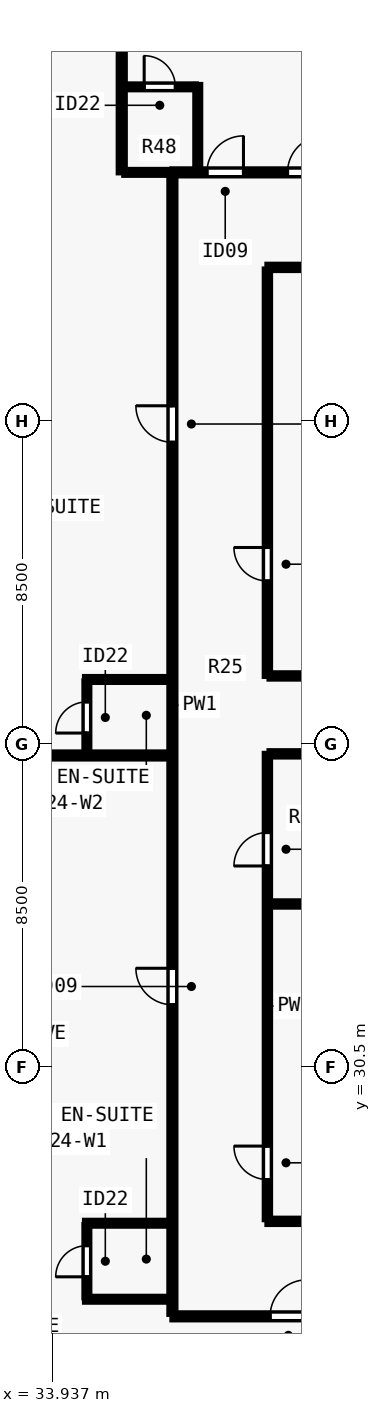
"""IFC4 building model, lengths in metres.
Left out: names, types, materials, properties, quantities, classifications, styles, units other than length and angle.
Written with IfcOpenShell. Run it as: python <this file> out.ifc"""

import sys

from ifc_helpers import new_model, si_unit, direction, frame, frame_2d, origin, place, context, subcontext, project, spatial, rectangle, extrude, element, fill, save


model = new_model("IFC4")
c1 = context("Model", 3, precision=1e-05, world=origin(), true_north=direction((0.0, 1.0)))
c2 = subcontext(c1, "Body", "Model", "MODEL_VIEW")
j1 = project(units=[si_unit("LENGTHUNIT", "METRE"), si_unit("PLANEANGLEUNIT", "RADIAN")], contexts=[c1])
p1 = place(None, origin())
s1 = spatial("IfcSite", under=j1, at=p1, CompositionType="ELEMENT")
p2 = place(p1, origin())
s2 = spatial("IfcBuilding", under=s1, at=p2, CompositionType="ELEMENT")
p3 = place(p2, frame((0.0, 0.0, 90.0)))
s3 = spatial("IfcBuildingStorey", under=s2, at=p3, CompositionType="ELEMENT", Elevation=90.0)
p4 = place(p3, frame((37.1, 23.95, 0.0), z_axis=(0.0, 0.0, 1.0), x_axis=(1.0, 0.0, 0.0)))
e1 = element("IfcWall", 1, at=p4, inside=s3, PredefinedType="PARTITIONING", context=c2, shape_type="SweptSolid", body=[
    extrude(rectangle(XDim=29.8, YDim=0.16, at=frame_2d((14.9, 0.0))), origin(), (0.0, 0.0, 1.0), 3.28),
])
p5 = place(p4, frame((2.571, 0.0, 0.0)))
e2 = element("IfcOpeningElement", 2, at=p5, cuts=e1, PredefinedType="OPENING", context=c2, shape_type="SweptSolid", body=[
    extrude(rectangle(XDim=0.96, YDim=2.15, at=frame_2d((0.48, 1.075))), frame((0.0, 0.09, 0.0), z_axis=(0.0, -1.0, 0.0), x_axis=(1.0, 0.0, 0.0)), (0.0, 0.0, 1.0), 0.18),
])
p6 = place(p4, frame((15.42, 0.0, 0.0)))
e3 = element("IfcOpeningElement", 3, at=p6, cuts=e1, PredefinedType="OPENING", context=c2, shape_type="SweptSolid", body=[
    extrude(rectangle(XDim=0.96, YDim=2.15, at=frame_2d((0.48, 1.075))), frame((0.0, 0.09, 0.0), z_axis=(0.0, -1.0, 0.0), x_axis=(1.0, 0.0, 0.0)), (0.0, 0.0, 1.0), 0.18),
])
p7 = place(p4, frame((27.269, 0.0, 0.0)))
e4 = element("IfcOpeningElement", 4, at=p7, cuts=e1, PredefinedType="OPENING", context=c2, shape_type="SweptSolid", body=[
    extrude(rectangle(XDim=0.96, YDim=2.15, at=frame_2d((0.48, 1.075))), frame((0.0, 0.09, 0.0), z_axis=(0.0, -1.0, 0.0), x_axis=(1.0, 0.0, 0.0)), (0.0, 0.0, 1.0), 0.18),
])
p8 = place(p3, frame((37.1, 54.05, 0.0), z_axis=(0.0, 0.0, 1.0), x_axis=(1.0, 0.0, 0.0)))
e5 = element("IfcWall", 5, at=p8, inside=s3, PredefinedType="PARTITIONING", context=c2, shape_type="SweptSolid", body=[
    extrude(rectangle(XDim=29.8, YDim=0.16, at=frame_2d((14.9, 0.0))), origin(), (0.0, 0.0, 1.0), 3.28),
])
p9 = place(p8, frame((0.91, 0.0, 0.0)))
e6 = element("IfcOpeningElement", 6, at=p9, cuts=e5, PredefinedType="OPENING", context=c2, shape_type="SweptSolid", body=[
    extrude(rectangle(XDim=0.96, YDim=2.15, at=frame_2d((0.48, 1.075))), frame((0.0, 0.09, 0.0), z_axis=(0.0, -1.0, 0.0), x_axis=(1.0, 0.0, 0.0)), (0.0, 0.0, 1.0), 0.18),
])
p10 = place(p8, frame((3.03, 0.0, 0.0)))
e7 = element("IfcOpeningElement", 7, at=p10, cuts=e5, PredefinedType="OPENING", context=c2, shape_type="SweptSolid", body=[
    extrude(rectangle(XDim=0.96, YDim=2.15, at=frame_2d((0.48, 1.075))), frame((0.0, 0.09, 0.0), z_axis=(0.0, -1.0, 0.0), x_axis=(1.0, 0.0, 0.0)), (0.0, 0.0, 1.0), 0.18),
])
p11 = place(p8, frame((11.39, 0.0, 0.0)))
e8 = element("IfcOpeningElement", 8, at=p11, cuts=e5, PredefinedType="OPENING", context=c2, shape_type="SweptSolid", body=[
    extrude(rectangle(XDim=0.96, YDim=2.15, at=frame_2d((0.48, 1.075))), frame((0.0, 0.09, 0.0), z_axis=(0.0, -1.0, 0.0), x_axis=(1.0, 0.0, 0.0)), (0.0, 0.0, 1.0), 0.18),
])
p12 = place(p8, frame((19.75, 0.0, 0.0)))
e9 = element("IfcOpeningElement", 9, at=p12, cuts=e5, PredefinedType="OPENING", context=c2, shape_type="SweptSolid", body=[
    extrude(rectangle(XDim=0.96, YDim=2.15, at=frame_2d((0.48, 1.075))), frame((0.0, 0.09, 0.0), z_axis=(0.0, -1.0, 0.0), x_axis=(1.0, 0.0, 0.0)), (0.0, 0.0, 1.0), 0.18),
])
p13 = place(p8, frame((26.931, 0.0, 0.0)))
e10 = element("IfcOpeningElement", 10, at=p13, cuts=e5, PredefinedType="OPENING", context=c2, shape_type="SweptSolid", body=[
    extrude(rectangle(XDim=0.96, YDim=2.15, at=frame_2d((0.48, 1.075))), frame((0.0, 0.09, 0.0), z_axis=(0.0, -1.0, 0.0), x_axis=(1.0, 0.0, 0.0)), (0.0, 0.0, 1.0), 0.18),
])
p14 = place(p8, frame((28.48, 0.0, 0.0)))
e11 = element("IfcOpeningElement", 11, at=p14, cuts=e5, PredefinedType="OPENING", context=c2, shape_type="SweptSolid", body=[
    extrude(rectangle(XDim=0.96, YDim=2.15, at=frame_2d((0.48, 1.075))), frame((0.0, 0.09, 0.0), z_axis=(0.0, -1.0, 0.0), x_axis=(1.0, 0.0, 0.0)), (0.0, 0.0, 1.0), 0.18),
])
p15 = place(p3, frame((37.1, 24.015, 0.0), z_axis=(0.0, 0.0, 1.0), x_axis=(0.0, 1.0, 0.0)))
e12 = element("IfcWall", 12, at=p15, inside=s3, PredefinedType="PARTITIONING", context=c2, shape_type="SweptSolid", body=[
    extrude(rectangle(XDim=29.97, YDim=0.16, at=frame_2d((14.985, 0.0))), origin(), (0.0, 0.0, 1.0), 3.28),
])
p16 = place(p15, frame((8.134, 0.0, 0.0)))
e13 = element("IfcOpeningElement", 13, at=p16, cuts=e12, PredefinedType="OPENING", context=c2, shape_type="SweptSolid", body=[
    extrude(rectangle(XDim=0.96, YDim=2.15, at=frame_2d((0.48, 1.075))), frame((0.0, 0.09, 0.0), z_axis=(0.0, -1.0, 0.0), x_axis=(1.0, 0.0, 0.0)), (0.0, 0.0, 1.0), 0.18),
])
p17 = place(p15, frame((22.934, 0.0, 0.0)))
e14 = element("IfcOpeningElement", 14, at=p17, cuts=e12, PredefinedType="OPENING", context=c2, shape_type="SweptSolid", body=[
    extrude(rectangle(XDim=0.96, YDim=2.15, at=frame_2d((0.48, 1.075))), frame((0.0, 0.09, 0.0), z_axis=(0.0, -1.0, 0.0), x_axis=(1.0, 0.0, 0.0)), (0.0, 0.0, 1.0), 0.18),
])
p18 = place(p3, frame((39.6, 26.45, 0.0), z_axis=(0.0, 0.0, 1.0), x_axis=(1.0, 0.0, 0.0)))
e15 = element("IfcWall", 15, at=p18, inside=s3, PredefinedType="PARTITIONING", context=c2, shape_type="SweptSolid", body=[
    extrude(rectangle(XDim=24.8, YDim=0.14, at=frame_2d((12.4, 0.0))), origin(), (0.0, 0.0, 1.0), 3.28),
])
p19 = place(p18, frame((1.2, 0.0, 0.0)))
e16 = element("IfcOpeningElement", 16, at=p19, cuts=e15, PredefinedType="OPENING", context=c2, shape_type="SweptSolid", body=[
    extrude(rectangle(XDim=0.88, YDim=2.1, at=frame_2d((0.44, 1.05))), frame((0.0, 0.08, 0.0), z_axis=(0.0, -1.0, 0.0), x_axis=(1.0, 0.0, 0.0)), (0.0, 0.0, 1.0), 0.16),
])
p20 = place(p18, frame((8.9, 0.0, 0.0)))
e17 = element("IfcOpeningElement", 17, at=p20, cuts=e15, PredefinedType="OPENING", context=c2, shape_type="SweptSolid", body=[
    extrude(rectangle(XDim=0.88, YDim=2.1, at=frame_2d((0.44, 1.05))), frame((0.0, 0.08, 0.0), z_axis=(0.0, -1.0, 0.0), x_axis=(1.0, 0.0, 0.0)), (0.0, 0.0, 1.0), 0.16),
])
p21 = place(p18, frame((19.4, 0.0, 0.0)))
e18 = element("IfcOpeningElement", 18, at=p21, cuts=e15, PredefinedType="OPENING", context=c2, shape_type="SweptSolid", body=[
    extrude(rectangle(XDim=0.88, YDim=2.1, at=frame_2d((0.44, 1.05))), frame((0.0, 0.08, 0.0), z_axis=(0.0, -1.0, 0.0), x_axis=(1.0, 0.0, 0.0)), (0.0, 0.0, 1.0), 0.16),
])
p22 = place(p3, frame((39.6, 51.55, 0.0), z_axis=(0.0, 0.0, 1.0), x_axis=(1.0, 0.0, 0.0)))
e19 = element("IfcWall", 19, at=p22, inside=s3, PredefinedType="PARTITIONING", context=c2, shape_type="SweptSolid", body=[
    extrude(rectangle(XDim=24.8, YDim=0.14, at=frame_2d((12.4, 0.0))), origin(), (0.0, 0.0, 1.0), 3.28),
])
p23 = place(p22, frame((2.2, 0.0, 0.0)))
e20 = element("IfcOpeningElement", 20, at=p23, cuts=e19, PredefinedType="OPENING", context=c2, shape_type="SweptSolid", body=[
    extrude(rectangle(XDim=0.88, YDim=2.1, at=frame_2d((0.44, 1.05))), frame((0.0, 0.08, 0.0), z_axis=(0.0, -1.0, 0.0), x_axis=(1.0, 0.0, 0.0)), (0.0, 0.0, 1.0), 0.16),
])
p24 = place(p22, frame((12.9, 0.0, 0.0)))
e21 = element("IfcOpeningElement", 21, at=p24, cuts=e19, PredefinedType="OPENING", context=c2, shape_type="SweptSolid", body=[
    extrude(rectangle(XDim=0.88, YDim=2.1, at=frame_2d((0.44, 1.05))), frame((0.0, 0.08, 0.0), z_axis=(0.0, -1.0, 0.0), x_axis=(1.0, 0.0, 0.0)), (0.0, 0.0, 1.0), 0.16),
])
p25 = place(p22, frame((22.4, 0.0, 0.0)))
e22 = element("IfcOpeningElement", 22, at=p25, cuts=e19, PredefinedType="OPENING", context=c2, shape_type="SweptSolid", body=[
    extrude(rectangle(XDim=0.88, YDim=2.1, at=frame_2d((0.44, 1.05))), frame((0.0, 0.08, 0.0), z_axis=(0.0, -1.0, 0.0), x_axis=(1.0, 0.0, 0.0)), (0.0, 0.0, 1.0), 0.16),
])
p26 = place(p3, frame((39.6, 26.505, 0.0), z_axis=(0.0, 0.0, 1.0), x_axis=(0.0, 1.0, 0.0)))
e23 = element("IfcWall", 23, at=p26, inside=s3, PredefinedType="PARTITIONING", context=c2, shape_type="SweptSolid", body=[
    extrude(rectangle(XDim=12.245, YDim=0.14, at=frame_2d((6.123, 0.0))), origin(), (0.0, 0.0, 1.0), 3.28),
])
p27 = place(p26, frame((1.045, 0.0, 0.0)))
e24 = element("IfcOpeningElement", 24, at=p27, cuts=e23, PredefinedType="OPENING", context=c2, shape_type="SweptSolid", body=[
    extrude(rectangle(XDim=0.88, YDim=2.1, at=frame_2d((0.44, 1.05))), frame((0.0, 0.08, 0.0), z_axis=(0.0, -1.0, 0.0), x_axis=(1.0, 0.0, 0.0)), (0.0, 0.0, 1.0), 0.16),
])
p28 = place(p26, frame((9.295, 0.0, 0.0)))
e25 = element("IfcOpeningElement", 25, at=p28, cuts=e23, PredefinedType="OPENING", context=c2, shape_type="SweptSolid", body=[
    extrude(rectangle(XDim=0.88, YDim=2.1, at=frame_2d((0.44, 1.05))), frame((0.0, 0.08, 0.0), z_axis=(0.0, -1.0, 0.0), x_axis=(1.0, 0.0, 0.0)), (0.0, 0.0, 1.0), 0.16),
])
p29 = place(p3, frame((39.6, 40.8, 0.0), z_axis=(0.0, 0.0, 1.0), x_axis=(0.0, 1.0, 0.0)))
e26 = element("IfcWall", 26, at=p29, inside=s3, PredefinedType="PARTITIONING", context=c2, shape_type="SweptSolid", body=[
    extrude(rectangle(XDim=10.695, YDim=0.14, at=frame_2d((5.348, 0.0))), origin(), (0.0, 0.0, 1.0), 3.28),
])
p30 = place(p29, frame((2.5, 0.0, 0.0)))
e27 = element("IfcOpeningElement", 27, at=p30, cuts=e26, PredefinedType="OPENING", context=c2, shape_type="SweptSolid", body=[
    extrude(rectangle(XDim=0.88, YDim=2.1, at=frame_2d((0.44, 1.05))), frame((0.0, 0.08, 0.0), z_axis=(0.0, -1.0, 0.0), x_axis=(1.0, 0.0, 0.0)), (0.0, 0.0, 1.0), 0.16),
])
for number, where, z_axis, x_axis in (
    (28, (39.655, 38.75, 0.0), (0.0, 0.0, 1.0), (1.0, 0.0, 0.0)),
    (29, (39.655, 40.8, 0.0), (0.0, 0.0, 1.0), (1.0, 0.0, 0.0)),
    (30, (39.655, 34.8, 0.0), (0.0, 0.0, 1.0), (1.0, 0.0, 0.0)),
):
    element("IfcWall", number, at=place(p3, frame(where, z_axis=z_axis, x_axis=x_axis)), inside=s3, PredefinedType="PARTITIONING", context=c2, shape_type="SweptSolid", body=[
        extrude(rectangle(XDim=3.585, YDim=0.14, at=frame_2d((1.792, 0.0))), origin(), (0.0, 0.0, 1.0), 3.28),
    ])
p31 = place(p3, frame((35.768, 54.05, 0.0), z_axis=(0.0, 0.0, 1.0), x_axis=(0.0, 1.0, 0.0)))
e31 = element("IfcWall", 31, at=p31, inside=s3, PredefinedType="PARTITIONING", context=c2, shape_type="SweptSolid", body=[
    extrude(rectangle(XDim=10.105, YDim=0.16, at=frame_2d((5.052, 0.0))), origin(), (0.0, 0.0, 1.0), 2.439),
])
p32 = place(p3, frame((37.768, 54.115, 0.0), z_axis=(0.0, 0.0, 1.0), x_axis=(0.0, 1.0, 0.0)))
e32 = element("IfcWall", 32, at=p32, inside=s3, PredefinedType="PLUMBINGWALL", context=c2, shape_type="SweptSolid", body=[
    extrude(rectangle(XDim=2.235, YDim=0.13, at=frame_2d((1.118, 0.0))), origin(), (0.0, 0.0, 1.0), 2.439),
])
p33 = place(p3, frame((35.833, 56.3, 0.0), z_axis=(0.0, 0.0, 1.0), x_axis=(1.0, 0.0, 0.0)))
e33 = element("IfcWall", 33, at=p33, inside=s3, PredefinedType="PLUMBINGWALL", context=c2, shape_type="SweptSolid", body=[
    extrude(rectangle(XDim=1.885, YDim=0.13, at=frame_2d((0.942, 0.0))), origin(), (0.0, 0.0, 1.0), 3.28),
])
p34 = place(p33, frame((0.525, 0.0, 0.0)))
e34 = element("IfcOpeningElement", 34, at=p34, cuts=e33, PredefinedType="OPENING", context=c2, shape_type="SweptSolid", body=[
    extrude(rectangle(XDim=0.82, YDim=2.1, at=frame_2d((0.41, 1.05))), frame((0.0, 0.075, 0.0), z_axis=(0.0, -1.0, 0.0), x_axis=(1.0, 0.0, 0.0)), (0.0, 0.0, 1.0), 0.15),
])
p35 = place(p3, frame((35.833, 54.05, 0.0), z_axis=(0.0, 0.0, 1.0), x_axis=(1.0, 0.0, 0.0)))
e35 = element("IfcWall", 35, at=p35, inside=s3, PredefinedType="PLUMBINGWALL", context=c2, shape_type="SweptSolid", body=[
    extrude(rectangle(XDim=1.188, YDim=0.13, at=frame_2d((0.594, 0.0))), origin(), (0.0, 0.0, 1.0), 3.28),
])
p36 = place(p3, frame((34.8, 24.4, 0.0), z_axis=(0.0, 0.0, 1.0), x_axis=(1.0, 0.0, 0.0)))
e36 = element("IfcWall", 36, at=p36, inside=s3, PredefinedType="PLUMBINGWALL", context=c2, shape_type="SweptSolid", body=[
    extrude(rectangle(XDim=2.235, YDim=0.13, at=frame_2d((1.117, 0.0))), origin(), (0.0, 0.0, 1.0), 2.849),
])
p37 = place(p3, frame((34.8, 26.4, 0.0), z_axis=(0.0, 0.0, 1.0), x_axis=(1.0, 0.0, 0.0)))
e37 = element("IfcWall", 37, at=p37, inside=s3, PredefinedType="PLUMBINGWALL", context=c2, shape_type="SweptSolid", body=[
    extrude(rectangle(XDim=2.235, YDim=0.13, at=frame_2d((1.117, 0.0))), origin(), (0.0, 0.0, 1.0), 3.28),
])
p38 = place(p3, frame((34.85, 24.45, 0.0), z_axis=(0.0, 0.0, 1.0), x_axis=(0.0, 1.0, 0.0)))
e38 = element("IfcWall", 38, at=p38, inside=s3, PredefinedType="PLUMBINGWALL", context=c2, shape_type="SweptSolid", body=[
    extrude(rectangle(XDim=1.9, YDim=0.13, at=frame_2d((0.95, 0.0))), origin(), (0.0, 0.0, 1.0), 3.28),
])
p39 = place(p38, frame((0.54, 0.0, 0.0)))
e39 = element("IfcOpeningElement", 39, at=p39, cuts=e38, PredefinedType="OPENING", context=c2, shape_type="SweptSolid", body=[
    extrude(rectangle(XDim=0.82, YDim=2.1, at=frame_2d((0.41, 1.05))), frame((0.0, 0.075, 0.0), z_axis=(0.0, -1.0, 0.0), x_axis=(1.0, 0.0, 0.0)), (0.0, 0.0, 1.0), 0.15),
])
p40 = place(p3, frame((26.845, 38.708, 0.0), z_axis=(0.0, 0.0, 1.0), x_axis=(1.0, 0.0, 0.0)))
e40 = element("IfcWall", 40, at=p40, inside=s3, PredefinedType="PARTITIONING", context=c2, shape_type="SweptSolid", body=[
    extrude(rectangle(XDim=10.19, YDim=0.16, at=frame_2d((5.095, 0.0))), origin(), (0.0, 0.0, 1.0), 2.849),
])
p41 = place(p3, frame((34.8, 40.708, 0.0), z_axis=(0.0, 0.0, 1.0), x_axis=(1.0, 0.0, 0.0)))
e41 = element("IfcWall", 41, at=p41, inside=s3, PredefinedType="PLUMBINGWALL", context=c2, shape_type="SweptSolid", body=[
    extrude(rectangle(XDim=2.235, YDim=0.13, at=frame_2d((1.117, 0.0))), origin(), (0.0, 0.0, 1.0), 2.849),
])
p42 = place(p3, frame((34.85, 38.772, 0.0), z_axis=(0.0, 0.0, 1.0), x_axis=(0.0, 1.0, 0.0)))
e42 = element("IfcWall", 42, at=p42, inside=s3, PredefinedType="PLUMBINGWALL", context=c2, shape_type="SweptSolid", body=[
    extrude(rectangle(XDim=1.885, YDim=0.13, at=frame_2d((0.942, 0.0))), origin(), (0.0, 0.0, 1.0), 3.28),
])
p43 = place(p42, frame((0.525, 0.0, 0.0)))
e43 = element("IfcOpeningElement", 43, at=p43, cuts=e42, PredefinedType="OPENING", context=c2, shape_type="SweptSolid", body=[
    extrude(rectangle(XDim=0.82, YDim=2.1, at=frame_2d((0.41, 1.05))), frame((0.0, 0.075, 0.0), z_axis=(0.0, -1.0, 0.0), x_axis=(1.0, 0.0, 0.0)), (0.0, 0.0, 1.0), 0.15),
])
p44 = place(p27, origin())
e44 = element("IfcDoor", 44, at=p44, inside=s3, OperationType="SINGLE_SWING_RIGHT", PredefinedType="DOOR", context=c2, shape_type="SweptSolid", body=[
    extrude(rectangle(XDim=0.88, YDim=2.1, at=frame_2d((0.44, 1.05))), frame((0.0, 0.025, 0.0), z_axis=(0.0, -1.0, 0.0), x_axis=(1.0, 0.0, 0.0)), (0.0, 0.0, 1.0), 0.05),
])
fill(e24, e44)
p45 = place(p28, origin())
e45 = element("IfcDoor", 45, at=p45, inside=s3, OperationType="SINGLE_SWING_LEFT", PredefinedType="DOOR", context=c2, shape_type="SweptSolid", body=[
    extrude(rectangle(XDim=0.88, YDim=2.1, at=frame_2d((0.44, 1.05))), frame((0.0, 0.025, 0.0), z_axis=(0.0, -1.0, 0.0), x_axis=(1.0, 0.0, 0.0)), (0.0, 0.0, 1.0), 0.05),
])
fill(e25, e45)
p46 = place(p30, origin())
e46 = element("IfcDoor", 46, at=p46, inside=s3, OperationType="SINGLE_SWING_RIGHT", PredefinedType="DOOR", context=c2, shape_type="SweptSolid", body=[
    extrude(rectangle(XDim=0.88, YDim=2.1, at=frame_2d((0.44, 1.05))), frame((0.0, 0.025, 0.0), z_axis=(0.0, -1.0, 0.0), x_axis=(1.0, 0.0, 0.0)), (0.0, 0.0, 1.0), 0.05),
])
fill(e27, e46)
p47 = place(p5, origin())
e47 = element("IfcDoor", 47, at=p47, inside=s3, OperationType="SINGLE_SWING_RIGHT", PredefinedType="DOOR", context=c2, shape_type="SweptSolid", body=[
    extrude(rectangle(XDim=0.96, YDim=2.15, at=frame_2d((0.48, 1.075))), frame((0.0, 0.025, 0.0), z_axis=(0.0, -1.0, 0.0), x_axis=(1.0, 0.0, 0.0)), (0.0, 0.0, 1.0), 0.05),
])
fill(e2, e47)
p48 = place(p9, origin())
e48 = element("IfcDoor", 48, at=p48, inside=s3, OperationType="SINGLE_SWING_RIGHT", PredefinedType="DOOR", context=c2, shape_type="SweptSolid", body=[
    extrude(rectangle(XDim=0.96, YDim=2.15, at=frame_2d((0.48, 1.075))), frame((0.0, 0.025, 0.0), z_axis=(0.0, -1.0, 0.0), x_axis=(1.0, 0.0, 0.0)), (0.0, 0.0, 1.0), 0.05),
])
fill(e6, e48)
p49 = place(p34, origin())
e49 = element("IfcDoor", 49, at=p49, inside=s3, OperationType="SINGLE_SWING_LEFT", PredefinedType="DOOR", context=c2, shape_type="SweptSolid", body=[
    extrude(rectangle(XDim=0.82, YDim=2.1, at=frame_2d((0.41, 1.05))), frame((0.0, 0.025, 0.0), z_axis=(0.0, -1.0, 0.0), x_axis=(1.0, 0.0, 0.0)), (0.0, 0.0, 1.0), 0.05),
])
fill(e34, e49)
p50 = place(p10, origin())
e50 = element("IfcDoor", 50, at=p50, inside=s3, OperationType="SINGLE_SWING_RIGHT", PredefinedType="DOOR", context=c2, shape_type="SweptSolid", body=[
    extrude(rectangle(XDim=0.96, YDim=2.15, at=frame_2d((0.48, 1.075))), frame((0.0, 0.025, 0.0), z_axis=(0.0, -1.0, 0.0), x_axis=(1.0, 0.0, 0.0)), (0.0, 0.0, 1.0), 0.05),
])
fill(e7, e50)
p51 = place(p39, origin())
e51 = element("IfcDoor", 51, at=p51, inside=s3, OperationType="SINGLE_SWING_LEFT", PredefinedType="DOOR", context=c2, shape_type="SweptSolid", body=[
    extrude(rectangle(XDim=0.82, YDim=2.1, at=frame_2d((0.41, 1.05))), frame((0.0, 0.025, 0.0), z_axis=(0.0, -1.0, 0.0), x_axis=(1.0, 0.0, 0.0)), (0.0, 0.0, 1.0), 0.05),
])
fill(e39, e51)
p52 = place(p16, origin())
e52 = element("IfcDoor", 52, at=p52, inside=s3, OperationType="SINGLE_SWING_RIGHT", PredefinedType="DOOR", context=c2, shape_type="SweptSolid", body=[
    extrude(rectangle(XDim=0.96, YDim=2.15, at=frame_2d((0.48, 1.075))), frame((0.0, 0.025, 0.0), z_axis=(0.0, -1.0, 0.0), x_axis=(1.0, 0.0, 0.0)), (0.0, 0.0, 1.0), 0.05),
])
fill(e13, e52)
p53 = place(p43, origin())
e53 = element("IfcDoor", 53, at=p53, inside=s3, OperationType="SINGLE_SWING_LEFT", PredefinedType="DOOR", context=c2, shape_type="SweptSolid", body=[
    extrude(rectangle(XDim=0.82, YDim=2.1, at=frame_2d((0.41, 1.05))), frame((0.0, 0.025, 0.0), z_axis=(0.0, -1.0, 0.0), x_axis=(1.0, 0.0, 0.0)), (0.0, 0.0, 1.0), 0.05),
])
fill(e43, e53)
p54 = place(p17, origin())
e54 = element("IfcDoor", 54, at=p54, inside=s3, OperationType="SINGLE_SWING_RIGHT", PredefinedType="DOOR", context=c2, shape_type="SweptSolid", body=[
    extrude(rectangle(XDim=0.96, YDim=2.15, at=frame_2d((0.48, 1.075))), frame((0.0, 0.025, 0.0), z_axis=(0.0, -1.0, 0.0), x_axis=(1.0, 0.0, 0.0)), (0.0, 0.0, 1.0), 0.05),
])
fill(e14, e54)
save(model, sys.argv[1])
